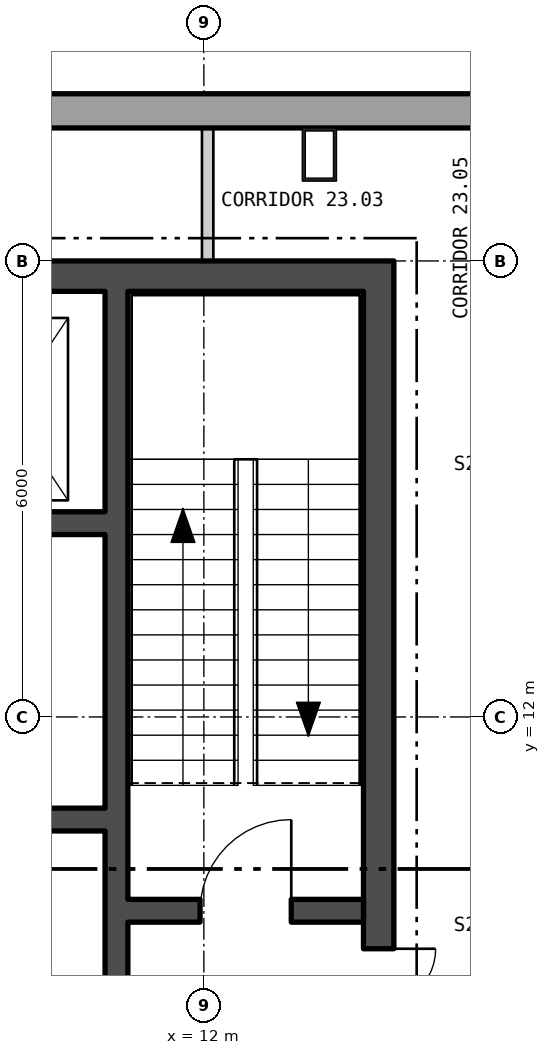
"""IFC4 building model, lengths in metres.
Left out: names, types, materials, properties, quantities, classifications, styles, units other than length and angle.
Written with IfcOpenShell. Run it as: python <this file> out.ifc"""

import sys

from ifc_helpers import new_model, si_unit, direction, frame, frame_2d, origin, origin_2d, place, context, subcontext, project, spatial, polyline, rectangle, hollow_rectangle, outline, extrude, element, fill, save


model = new_model("IFC4")
c1 = context("Model", 3, precision=1e-05, world=origin(), true_north=direction((0.0, 1.0)))
c2 = subcontext(c1, "Body", "Model", "MODEL_VIEW")
j1 = project(units=[si_unit("LENGTHUNIT", "METRE"), si_unit("PLANEANGLEUNIT", "RADIAN")], contexts=[c1])
p1 = place(None, origin())
s1 = spatial("IfcSite", under=j1, at=p1, CompositionType="ELEMENT")
p2 = place(p1, origin())
s2 = spatial("IfcBuilding", under=s1, at=p2, CompositionType="ELEMENT")
p3 = place(p2, frame((0.0, 0.0, 304.2)))
s3 = spatial("IfcBuildingStorey", under=s2, at=p3, CompositionType="ELEMENT", Elevation=304.2)
p4 = place(p3, frame((13.52, 19.4, 0.0), z_axis=(0.0, 0.0, 1.0), x_axis=(-1.0, 0.0, 0.0)))
e1 = element("IfcColumn", 1, at=p4, inside=s3, PredefinedType="COLUMN", context=c2, shape_type="SweptSolid", body=[
    extrude(hollow_rectangle(XDim=0.45, YDim=0.7, WallThickness=0.04, at=origin_2d()), origin(), (0.0, 0.0, 1.0), 4.2),
])
p5 = place(p3, frame((22.865, 19.975, -0.4), z_axis=(0.0, 0.0, 1.0), x_axis=(-1.0, 0.0, 0.0)))
e2 = element("IfcWall", 2, at=p5, inside=s3, PredefinedType="SOLIDWALL", context=c2, shape_type="SweptSolid", body=[
    extrude(outline(polyline([(-0.13, -0.225), (45.86, -0.225), (45.6, 0.225), (0.13, 0.225), (-0.13, -0.225)])), origin(), (0.0, 0.0, 1.0), 4.2),
])
p6 = place(p5, frame((1.424, 0.0, 1.3)))
e3 = element("IfcOpeningElement", 3, at=p6, cuts=e2, PredefinedType="OPENING", context=c2, shape_type="SweptSolid", body=[
    extrude(rectangle(XDim=2.4, YDim=2.3, at=frame_2d((1.2, 1.15))), frame((0.0, 0.235, 0.0), z_axis=(0.0, -1.0, 0.0), x_axis=(1.0, 0.0, 0.0)), (0.0, 0.0, 1.0), 0.47),
])
p7 = place(p5, frame((14.905, 0.0, 1.3)))
e4 = element("IfcOpeningElement", 4, at=p7, cuts=e2, PredefinedType="OPENING", context=c2, shape_type="SweptSolid", body=[
    extrude(rectangle(XDim=2.4, YDim=2.3, at=frame_2d((1.2, 1.15))), frame((0.0, 0.235, 0.0), z_axis=(0.0, -1.0, 0.0), x_axis=(1.0, 0.0, 0.0)), (0.0, 0.0, 1.0), 0.47),
])
p8 = place(p5, frame((19.412, 0.0, 1.3)))
e5 = element("IfcOpeningElement", 5, at=p8, cuts=e2, PredefinedType="OPENING", context=c2, shape_type="SweptSolid", body=[
    extrude(rectangle(XDim=2.4, YDim=2.3, at=frame_2d((1.2, 1.15))), frame((0.0, 0.235, 0.0), z_axis=(0.0, -1.0, 0.0), x_axis=(1.0, 0.0, 0.0)), (0.0, 0.0, 1.0), 0.47),
])
p9 = place(p5, frame((23.918, 0.0, 1.3)))
e6 = element("IfcOpeningElement", 6, at=p9, cuts=e2, PredefinedType="OPENING", context=c2, shape_type="SweptSolid", body=[
    extrude(rectangle(XDim=2.4, YDim=2.3, at=frame_2d((1.2, 1.15))), frame((0.0, 0.235, 0.0), z_axis=(0.0, -1.0, 0.0), x_axis=(1.0, 0.0, 0.0)), (0.0, 0.0, 1.0), 0.47),
])
p10 = place(p5, frame((28.425, 0.0, 1.3)))
e7 = element("IfcOpeningElement", 7, at=p10, cuts=e2, PredefinedType="OPENING", context=c2, shape_type="SweptSolid", body=[
    extrude(rectangle(XDim=2.4, YDim=2.3, at=frame_2d((1.2, 1.15))), frame((0.0, 0.235, 0.0), z_axis=(0.0, -1.0, 0.0), x_axis=(1.0, 0.0, 0.0)), (0.0, 0.0, 1.0), 0.47),
])
p11 = place(p5, frame((32.932, 0.0, 1.3)))
e8 = element("IfcOpeningElement", 8, at=p11, cuts=e2, PredefinedType="OPENING", context=c2, shape_type="SweptSolid", body=[
    extrude(rectangle(XDim=2.4, YDim=2.3, at=frame_2d((1.2, 1.15))), frame((0.0, 0.235, 0.0), z_axis=(0.0, -1.0, 0.0), x_axis=(1.0, 0.0, 0.0)), (0.0, 0.0, 1.0), 0.47),
])
p12 = place(p5, frame((41.907, 0.0, 1.3)))
e9 = element("IfcOpeningElement", 9, at=p12, cuts=e2, PredefinedType="OPENING", context=c2, shape_type="SweptSolid", body=[
    extrude(rectangle(XDim=2.4, YDim=2.3, at=frame_2d((1.2, 1.15))), frame((0.0, 0.235, 0.0), z_axis=(0.0, -1.0, 0.0), x_axis=(1.0, 0.0, 0.0)), (0.0, 0.0, 1.0), 0.47),
])
p13 = place(p3, frame((2.23, -23.491, -0.18), z_axis=(0.0, 0.0, 1.0), x_axis=(0.500000141277, 0.866025322218, 0.0)))
e10 = element("IfcWall", 10, at=p13, inside=s3, PredefinedType="SOLIDWALL", context=c2, shape_type="SweptSolid", body=[
    extrude(outline(polyline([(-0.13, -0.225), (45.86, -0.225), (45.6, 0.225), (0.13, 0.225), (-0.13, -0.225)])), origin(), (0.0, 0.0, 1.0), 3.98),
])
p14 = place(p13, frame((1.424, 0.0, 1.08)))
e11 = element("IfcOpeningElement", 11, at=p14, cuts=e10, PredefinedType="OPENING", context=c2, shape_type="SweptSolid", body=[
    extrude(rectangle(XDim=2.4, YDim=2.3, at=frame_2d((1.2, 1.15))), frame((0.0, 0.235, 0.0), z_axis=(0.0, -1.0, 0.0), x_axis=(1.0, 0.0, 0.0)), (0.0, 0.0, 1.0), 0.47),
])
p15 = place(p13, frame((5.892, 0.0, 1.08)))
e12 = element("IfcOpeningElement", 12, at=p15, cuts=e10, PredefinedType="OPENING", context=c2, shape_type="SweptSolid", body=[
    extrude(rectangle(XDim=2.4, YDim=2.3, at=frame_2d((1.2, 1.15))), frame((0.0, 0.235, 0.0), z_axis=(0.0, -1.0, 0.0), x_axis=(1.0, 0.0, 0.0)), (0.0, 0.0, 1.0), 0.47),
])
p16 = place(p13, frame((10.399, 0.0, 1.08)))
e13 = element("IfcOpeningElement", 13, at=p16, cuts=e10, PredefinedType="OPENING", context=c2, shape_type="SweptSolid", body=[
    extrude(rectangle(XDim=2.4, YDim=2.3, at=frame_2d((1.2, 1.15))), frame((0.0, 0.235, 0.0), z_axis=(0.0, -1.0, 0.0), x_axis=(1.0, 0.0, 0.0)), (0.0, 0.0, 1.0), 0.47),
])
p17 = place(p13, frame((14.905, 0.0, 1.08)))
e14 = element("IfcOpeningElement", 14, at=p17, cuts=e10, PredefinedType="OPENING", context=c2, shape_type="SweptSolid", body=[
    extrude(rectangle(XDim=2.4, YDim=2.3, at=frame_2d((1.2, 1.15))), frame((0.0, 0.235, 0.0), z_axis=(0.0, -1.0, 0.0), x_axis=(1.0, 0.0, 0.0)), (0.0, 0.0, 1.0), 0.47),
])
p18 = place(p13, frame((19.412, 0.0, 1.08)))
e15 = element("IfcOpeningElement", 15, at=p18, cuts=e10, PredefinedType="OPENING", context=c2, shape_type="SweptSolid", body=[
    extrude(rectangle(XDim=2.4, YDim=2.3, at=frame_2d((1.2, 1.15))), frame((0.0, 0.235, 0.0), z_axis=(0.0, -1.0, 0.0), x_axis=(1.0, 0.0, 0.0)), (0.0, 0.0, 1.0), 0.47),
])
p19 = place(p13, frame((23.918, 0.0, 1.08)))
e16 = element("IfcOpeningElement", 16, at=p19, cuts=e10, PredefinedType="OPENING", context=c2, shape_type="SweptSolid", body=[
    extrude(rectangle(XDim=2.4, YDim=2.3, at=frame_2d((1.2, 1.15))), frame((0.0, 0.235, 0.0), z_axis=(0.0, -1.0, 0.0), x_axis=(1.0, 0.0, 0.0)), (0.0, 0.0, 1.0), 0.47),
])
p20 = place(p13, frame((28.425, 0.0, 1.08)))
e17 = element("IfcOpeningElement", 17, at=p20, cuts=e10, PredefinedType="OPENING", context=c2, shape_type="SweptSolid", body=[
    extrude(rectangle(XDim=2.4, YDim=2.3, at=frame_2d((1.2, 1.15))), frame((0.0, 0.235, 0.0), z_axis=(0.0, -1.0, 0.0), x_axis=(1.0, 0.0, 0.0)), (0.0, 0.0, 1.0), 0.47),
])
p21 = place(p13, frame((32.932, 0.0, 1.08)))
e18 = element("IfcOpeningElement", 18, at=p21, cuts=e10, PredefinedType="OPENING", context=c2, shape_type="SweptSolid", body=[
    extrude(rectangle(XDim=2.4, YDim=2.3, at=frame_2d((1.2, 1.15))), frame((0.0, 0.235, 0.0), z_axis=(0.0, -1.0, 0.0), x_axis=(1.0, 0.0, 0.0)), (0.0, 0.0, 1.0), 0.47),
])
p22 = place(p13, frame((37.438, 0.0, 1.08)))
e19 = element("IfcOpeningElement", 19, at=p22, cuts=e10, PredefinedType="OPENING", context=c2, shape_type="SweptSolid", body=[
    extrude(rectangle(XDim=2.4, YDim=2.3, at=frame_2d((1.2, 1.15))), frame((0.0, 0.235, 0.0), z_axis=(0.0, -1.0, 0.0), x_axis=(1.0, 0.0, 0.0)), (0.0, 0.0, 1.0), 0.47),
])
p23 = place(p13, frame((41.907, 0.0, 1.08)))
e20 = element("IfcOpeningElement", 20, at=p23, cuts=e10, PredefinedType="OPENING", context=c2, shape_type="SweptSolid", body=[
    extrude(rectangle(XDim=2.4, YDim=2.3, at=frame_2d((1.2, 1.15))), frame((0.0, 0.235, 0.0), z_axis=(0.0, -1.0, 0.0), x_axis=(1.0, 0.0, 0.0)), (0.0, 0.0, 1.0), 0.47),
])
p24 = place(p3, frame((-14.5, 17.8, 0.0), z_axis=(0.0, 0.0, 1.0), x_axis=(1.0, 0.0, 0.0)))
e21 = element("IfcWall", 21, at=p24, inside=s3, PredefinedType="SHEAR", context=c2, shape_type="SweptSolid", body=[
    extrude(rectangle(XDim=29.0, YDim=0.4, at=frame_2d((14.5, 0.0))), origin(), (0.0, 0.0, 1.0), 4.0),
])
p25 = place(p3, frame((14.3, 4.4, 0.0), z_axis=(0.0, 0.0, 1.0), x_axis=(0.0, 1.0, 0.0)))
e22 = element("IfcWall", 22, at=p25, inside=s3, PredefinedType="SHEAR", context=c2, shape_type="SweptSolid", body=[
    extrude(rectangle(XDim=13.2, YDim=0.4, at=frame_2d((6.6, 0.0))), origin(), (0.0, 0.0, 1.0), 4.0),
])
p26 = place(p25, frame((3.05, 0.0, 0.0)))
e23 = element("IfcOpeningElement", 23, at=p26, cuts=e22, PredefinedType="OPENING", context=c2, shape_type="SweptSolid", body=[
    extrude(rectangle(XDim=1.5, YDim=2.1, at=frame_2d((0.75, 1.05))), frame((0.0, 0.21, 0.0), z_axis=(0.0, -1.0, 0.0), x_axis=(1.0, 0.0, 0.0)), (0.0, 0.0, 1.0), 0.42),
])
p27 = place(p3, frame((10.85, 4.4, 0.0), z_axis=(0.0, 0.0, 1.0), x_axis=(0.0, 1.0, 0.0)))
e24 = element("IfcWall", 24, at=p27, inside=s3, PredefinedType="SHEAR", context=c2, shape_type="SweptSolid", body=[
    extrude(rectangle(XDim=13.2, YDim=0.3, at=frame_2d((6.6, 0.0))), origin(), (0.0, 0.0, 1.0), 4.0),
])
p28 = place(p27, frame((1.575, 0.0, 0.0)))
e25 = element("IfcOpeningElement", 25, at=p28, cuts=e24, PredefinedType="OPENING", context=c2, shape_type="SweptSolid", body=[
    extrude(rectangle(XDim=1.25, YDim=2.1, at=frame_2d((0.625, 1.05))), frame((0.0, 0.16, 0.0), z_axis=(0.0, -1.0, 0.0), x_axis=(1.0, 0.0, 0.0)), (0.0, 0.0, 1.0), 0.32),
])
p29 = place(p27, frame((0.4, 0.0, 0.0)))
e26 = element("IfcOpeningElement", 26, at=p29, cuts=e24, PredefinedType="OPENING", context=c2, shape_type="SweptSolid", body=[
    extrude(rectangle(XDim=0.9, YDim=2.1, at=frame_2d((0.45, 1.05))), frame((0.0, 0.16, 0.0), z_axis=(0.0, -1.0, 0.0), x_axis=(1.0, 0.0, 0.0)), (0.0, 0.0, 1.0), 0.32),
])
p30 = place(p3, frame((11.0, 9.45, 0.0), z_axis=(0.0, 0.0, 1.0), x_axis=(1.0, 0.0, 0.0)))
e27 = element("IfcWall", 27, at=p30, inside=s3, PredefinedType="SHEAR", context=c2, shape_type="SweptSolid", body=[
    extrude(rectangle(XDim=3.1, YDim=0.3, at=frame_2d((1.55, 0.0))), origin(), (0.0, 0.0, 1.0), 4.0),
])
p31 = place(p30, frame((0.95, 0.0, 0.0)))
e28 = element("IfcOpeningElement", 28, at=p31, cuts=e27, PredefinedType="OPENING", context=c2, shape_type="SweptSolid", body=[
    extrude(rectangle(XDim=1.2, YDim=2.1, at=frame_2d((0.6, 1.05))), frame((0.0, 0.16, 0.0), z_axis=(0.0, -1.0, 0.0), x_axis=(1.0, 0.0, 0.0)), (0.0, 0.0, 1.0), 0.32),
])
p32 = place(p3, frame((-10.7, 14.55, 0.0), z_axis=(0.0, 0.0, 1.0), x_axis=(1.0, 0.0, 0.0)))
e29 = element("IfcWall", 29, at=p32, inside=s3, PredefinedType="SHEAR", context=c2, shape_type="SweptSolid", body=[
    extrude(rectangle(XDim=21.4, YDim=0.3, at=frame_2d((10.7, 0.0))), origin(), (0.0, 0.0, 1.0), 4.0),
])
p33 = place(p32, frame((0.738, 0.0, 0.0)))
e30 = element("IfcOpeningElement", 30, at=p33, cuts=e29, PredefinedType="OPENING", context=c2, shape_type="SweptSolid", body=[
    extrude(rectangle(XDim=1.1, YDim=2.1, at=frame_2d((0.55, 1.05))), frame((0.0, 0.16, 0.0), z_axis=(0.0, -1.0, 0.0), x_axis=(1.0, 0.0, 0.0)), (0.0, 0.0, 1.0), 0.32),
])
p34 = place(p32, frame((3.462, 0.0, 0.0)))
e31 = element("IfcOpeningElement", 31, at=p34, cuts=e29, PredefinedType="OPENING", context=c2, shape_type="SweptSolid", body=[
    extrude(rectangle(XDim=1.1, YDim=2.1, at=frame_2d((0.55, 1.05))), frame((0.0, 0.16, 0.0), z_axis=(0.0, -1.0, 0.0), x_axis=(1.0, 0.0, 0.0)), (0.0, 0.0, 1.0), 0.32),
])
p35 = place(p32, frame((6.138, 0.0, 0.0)))
e32 = element("IfcOpeningElement", 32, at=p35, cuts=e29, PredefinedType="OPENING", context=c2, shape_type="SweptSolid", body=[
    extrude(rectangle(XDim=1.1, YDim=2.1, at=frame_2d((0.55, 1.05))), frame((0.0, 0.16, 0.0), z_axis=(0.0, -1.0, 0.0), x_axis=(1.0, 0.0, 0.0)), (0.0, 0.0, 1.0), 0.32),
])
p36 = place(p32, frame((8.812, 0.0, 0.0)))
e33 = element("IfcOpeningElement", 33, at=p36, cuts=e29, PredefinedType="OPENING", context=c2, shape_type="SweptSolid", body=[
    extrude(rectangle(XDim=1.1, YDim=2.1, at=frame_2d((0.55, 1.05))), frame((0.0, 0.16, 0.0), z_axis=(0.0, -1.0, 0.0), x_axis=(1.0, 0.0, 0.0)), (0.0, 0.0, 1.0), 0.32),
])
p37 = place(p32, frame((19.562, 0.0, 0.0)))
e34 = element("IfcOpeningElement", 34, at=p37, cuts=e29, PredefinedType="OPENING", context=c2, shape_type="SweptSolid", body=[
    extrude(rectangle(XDim=1.1, YDim=2.1, at=frame_2d((0.55, 1.05))), frame((0.0, 0.16, 0.0), z_axis=(0.0, -1.0, 0.0), x_axis=(1.0, 0.0, 0.0)), (0.0, 0.0, 1.0), 0.32),
])
p38 = place(p32, frame((11.537, 0.0, 0.0)))
e35 = element("IfcOpeningElement", 35, at=p38, cuts=e29, PredefinedType="OPENING", context=c2, shape_type="SweptSolid", body=[
    extrude(rectangle(XDim=1.0, YDim=2.1, at=frame_2d((0.5, 1.05))), frame((0.0, 0.16, 0.0), z_axis=(0.0, -1.0, 0.0), x_axis=(1.0, 0.0, 0.0)), (0.0, 0.0, 1.0), 0.32),
])
p39 = place(p32, frame((14.213, 0.0, 0.0)))
e36 = element("IfcOpeningElement", 36, at=p39, cuts=e29, PredefinedType="OPENING", context=c2, shape_type="SweptSolid", body=[
    extrude(rectangle(XDim=1.0, YDim=2.1, at=frame_2d((0.5, 1.05))), frame((0.0, 0.16, 0.0), z_axis=(0.0, -1.0, 0.0), x_axis=(1.0, 0.0, 0.0)), (0.0, 0.0, 1.0), 0.32),
])
p40 = place(p32, frame((16.887, 0.0, 0.0)))
e37 = element("IfcOpeningElement", 37, at=p40, cuts=e29, PredefinedType="OPENING", context=c2, shape_type="SweptSolid", body=[
    extrude(rectangle(XDim=1.0, YDim=2.1, at=frame_2d((0.5, 1.05))), frame((0.0, 0.16, 0.0), z_axis=(0.0, -1.0, 0.0), x_axis=(1.0, 0.0, 0.0)), (0.0, 0.0, 1.0), 0.32),
])
p41 = place(p3, frame((2.6, 10.65, 0.0), z_axis=(0.0, 0.0, 1.0), x_axis=(1.0, 0.0, 0.0)))
e38 = element("IfcWall", 38, at=p41, inside=s3, PredefinedType="SHEAR", context=c2, shape_type="SweptSolid", body=[
    extrude(rectangle(XDim=8.1, YDim=0.3, at=frame_2d((4.05, 0.0))), origin(), (0.0, 0.0, 1.0), 4.0),
])
p42 = place(p41, frame((0.933, 0.0, 0.0)))
e39 = element("IfcOpeningElement", 39, at=p42, cuts=e38, PredefinedType="OPENING", context=c2, shape_type="SweptSolid", body=[
    extrude(rectangle(XDim=1.0, YDim=2.1, at=frame_2d((0.5, 1.05))), frame((0.0, 0.16, 0.0), z_axis=(0.0, -1.0, 0.0), x_axis=(1.0, 0.0, 0.0)), (0.0, 0.0, 1.0), 0.32),
])
p43 = place(p41, frame((3.6, 0.0, 0.0)))
e40 = element("IfcOpeningElement", 40, at=p43, cuts=e38, PredefinedType="OPENING", context=c2, shape_type="SweptSolid", body=[
    extrude(rectangle(XDim=1.0, YDim=2.1, at=frame_2d((0.5, 1.05))), frame((0.0, 0.16, 0.0), z_axis=(0.0, -1.0, 0.0), x_axis=(1.0, 0.0, 0.0)), (0.0, 0.0, 1.0), 0.32),
])
p44 = place(p41, frame((6.317, 0.0, 0.0)))
e41 = element("IfcOpeningElement", 41, at=p44, cuts=e38, PredefinedType="OPENING", context=c2, shape_type="SweptSolid", body=[
    extrude(rectangle(XDim=1.0, YDim=2.1, at=frame_2d((0.5, 1.05))), frame((0.0, 0.16, 0.0), z_axis=(0.0, -1.0, 0.0), x_axis=(1.0, 0.0, 0.0)), (0.0, 0.0, 1.0), 0.32),
])
p45 = place(p3, frame((12.05, 18.0, 0.0), z_axis=(0.0, 0.0, 1.0), x_axis=(0.0, 1.0, 0.0)))
e42 = element("IfcWall", 42, at=p45, inside=s3, PredefinedType="PARTITIONING", context=c2, shape_type="SweptSolid", body=[
    extrude(rectangle(XDim=1.75, YDim=0.15, at=frame_2d((0.875, 0.0))), origin(), (0.0, 0.0, 1.0), 4.0),
])
p46 = place(p31, origin())
e43 = element("IfcDoor", 43, at=p46, inside=s3, OperationType="SINGLE_SWING_LEFT", PredefinedType="DOOR", context=c2, shape_type="SweptSolid", body=[
    extrude(rectangle(XDim=1.2, YDim=2.1, at=frame_2d((0.6, 1.05))), frame((0.0, 0.025, 0.0), z_axis=(0.0, -1.0, 0.0), x_axis=(1.0, 0.0, 0.0)), (0.0, 0.0, 1.0), 0.05),
])
fill(e28, e43)
p47 = place(p26, origin())
e44 = element("IfcDoor", 44, at=p47, inside=s3, OperationType="DOUBLE_DOOR_SINGLE_SWING", PredefinedType="DOOR", context=c2, shape_type="SweptSolid", body=[
    extrude(rectangle(XDim=1.5, YDim=2.1, at=frame_2d((0.75, 1.05))), frame((0.0, 0.025, 0.0), z_axis=(0.0, -1.0, 0.0), x_axis=(1.0, 0.0, 0.0)), (0.0, 0.0, 1.0), 0.05),
])
fill(e23, e44)
save(model, sys.argv[1])
